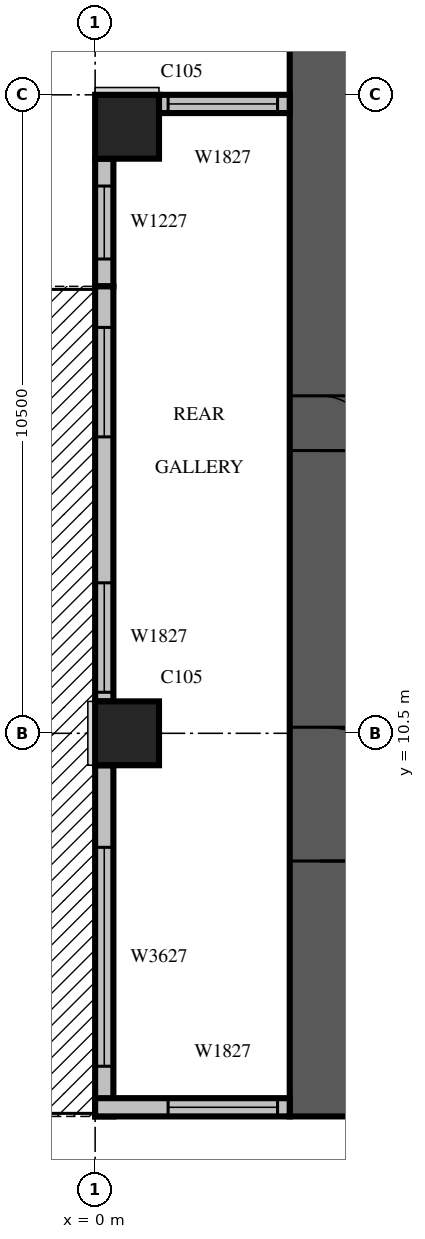
"""IFC4 building model, lengths in metres.
Left out: names, types, materials, properties, quantities, classifications, styles, units other than length and angle.
Written with IfcOpenShell. Run it as: python <this file> out.ifc"""

import sys

from ifc_helpers import new_model, si_unit, direction, frame, frame_2d, origin, origin_2d, place, context, subcontext, project, spatial, rectangle, extrude, source, transform, mapped, element, fill, save


model = new_model("IFC4")
c1 = context("Model", 3, precision=1e-05, world=origin(), true_north=direction((0.0, 1.0)))
c2 = subcontext(c1, "Body", "Model", "MODEL_VIEW")
j1 = project(units=[si_unit("LENGTHUNIT", "METRE"), si_unit("PLANEANGLEUNIT", "RADIAN")], contexts=[c1])
p1 = place(None, origin())
s1 = spatial("IfcSite", under=j1, at=p1, CompositionType="ELEMENT")
p2 = place(p1, origin())
s2 = spatial("IfcBuilding", under=s1, at=p2, CompositionType="ELEMENT")
p3 = place(p2, frame((0.0, 0.0, 137.1)))
s3 = spatial("IfcBuildingStorey", under=s2, at=p3, CompositionType="ELEMENT", Elevation=137.1)
m1 = source(origin(), c2, "Body", "SweptSolid", [
    extrude(rectangle(XDim=1.05, YDim=1.05, at=origin_2d()), origin(), (0.0, 0.0, 1.0), 4.2),
])
for number, where, z_axis, x_axis in (
    (1, (0.525, 10.5, 0.0), (0.0, 0.0, 1.0), (1.0, 0.0, 0.0)),
    (2, (0.525, 20.475, 0.0), (0.0, 0.0, 1.0), (1.0, 0.0, 0.0)),
):
    element("IfcColumn", number, at=place(p3, frame(where, z_axis=z_axis, x_axis=x_axis)), inside=s3, PredefinedType="COLUMN", context=c2, shape_type="MappedRepresentation", body=[
        mapped(m1, transform((0.0, 0.0, 0.0), scale=1.0)),
    ])
m2 = source(origin(), c2, "Body", "SweptSolid", [
    extrude(rectangle(XDim=17.8, YDim=1.0, at=frame_2d((8.9, 0.0))), origin(), (0.0, 0.0, 1.0), 4.2),
])
p4 = place(p3, frame((3.7, 4.2, 0.0), z_axis=(0.0, 0.0, 1.0), x_axis=(0.0, 1.0, 0.0)))
e3 = element("IfcWall", 3, at=p4, inside=s3, PredefinedType="SHEAR", context=c2, shape_type="MappedRepresentation", body=[
    mapped(m2, transform((0.0, 0.0, 0.0), scale=1.0)),
])
m3 = source(origin(), c2, "Body", "SweptSolid", [
    extrude(rectangle(XDim=2.2, YDim=2.1, at=frame_2d((1.1, 1.05))), frame((0.0, 0.51, 0.0), z_axis=(0.0, -1.0, 0.0), x_axis=(1.0, 0.0, 0.0)), (0.0, 0.0, 1.0), 1.02),
])
p5 = place(p4, frame((4.2, 0.0, 0.0)))
e4 = element("IfcOpeningElement", 4, at=p5, cuts=e3, PredefinedType="OPENING", context=c2, shape_type="MappedRepresentation", body=[
    mapped(m3, transform((0.0, 0.0, 0.0), scale=1.0)),
])
m4 = source(origin(), c2, "Body", "SweptSolid", [
    extrude(rectangle(XDim=0.9, YDim=2.1, at=frame_2d((0.45, 1.05))), frame((0.0, 0.51, 0.0), z_axis=(0.0, -1.0, 0.0), x_axis=(1.0, 0.0, 0.0)), (0.0, 0.0, 1.0), 1.02),
])
p6 = place(p4, frame((10.95, 0.0, 0.0)))
e5 = element("IfcOpeningElement", 5, at=p6, cuts=e3, PredefinedType="OPENING", context=c2, shape_type="MappedRepresentation", body=[
    mapped(m4, transform((0.0, 0.0, 0.0), scale=1.0)),
])
m5 = source(origin(), c2, "Body", "SweptSolid", [
    extrude(rectangle(XDim=2.15, YDim=0.3, at=frame_2d((1.075, 0.0))), origin(), (0.0, 0.0, 1.0), 3.8),
])
p7 = place(p3, frame((3.2, 20.85, 0.0), z_axis=(0.0, 0.0, 1.0), x_axis=(-1.0, 0.0, 0.0)))
e6 = element("IfcWall", 6, at=p7, inside=s3, PredefinedType="STANDARD", context=c2, shape_type="MappedRepresentation", body=[
    mapped(m5, transform((0.0, 0.0, 0.0), scale=1.0)),
])
m6 = source(origin(), c2, "Body", "SweptSolid", [
    extrude(rectangle(XDim=1.8, YDim=2.7, at=frame_2d((0.9, 1.35))), frame((0.0, 0.16, 0.0), z_axis=(0.0, -1.0, 0.0), x_axis=(1.0, 0.0, 0.0)), (0.0, 0.0, 1.0), 0.32),
])
p8 = place(p7, frame((0.2, 0.0, 0.6)))
e7 = element("IfcOpeningElement", 7, at=p8, cuts=e6, PredefinedType="OPENING", context=c2, shape_type="MappedRepresentation", body=[
    mapped(m6, transform((0.0, 0.0, 0.0), scale=1.0)),
])
m7 = source(origin(), c2, "Body", "SweptSolid", [
    extrude(rectangle(XDim=2.1, YDim=0.3, at=frame_2d((1.05, 0.0))), origin(), (0.0, 0.0, 1.0), 3.8),
])
p9 = place(p3, frame((0.15, 19.95, 0.0), z_axis=(0.0, 0.0, 1.0), x_axis=(0.0, -1.0, 0.0)))
e8 = element("IfcWall", 8, at=p9, inside=s3, PredefinedType="STANDARD", context=c2, shape_type="MappedRepresentation", body=[
    mapped(m7, transform((0.0, 0.0, 0.0), scale=1.0)),
])
m8 = source(origin(), c2, "Body", "SweptSolid", [
    extrude(rectangle(XDim=1.2, YDim=2.7, at=frame_2d((0.6, 1.35))), frame((0.0, 0.16, 0.0), z_axis=(0.0, -1.0, 0.0), x_axis=(1.0, 0.0, 0.0)), (0.0, 0.0, 1.0), 0.32),
])
p10 = place(p9, frame((0.45, 0.0, 0.6)))
e9 = element("IfcOpeningElement", 9, at=p10, cuts=e8, PredefinedType="OPENING", context=c2, shape_type="MappedRepresentation", body=[
    mapped(m8, transform((0.0, 0.0, 0.0), scale=1.0)),
])
m9 = source(origin(), c2, "Body", "SweptSolid", [
    extrude(rectangle(XDim=6.825, YDim=0.3, at=frame_2d((3.413, 0.0))), origin(), (0.0, 0.0, 1.0), 3.8),
])
p11 = place(p3, frame((0.15, 17.85, 0.0), z_axis=(0.0, 0.0, 1.0), x_axis=(0.0, -1.0, 0.0)))
e10 = element("IfcWall", 10, at=p11, inside=s3, PredefinedType="STANDARD", context=c2, shape_type="MappedRepresentation", body=[
    mapped(m9, transform((0.0, 0.0, 0.0), scale=1.0)),
])
m10 = source(origin(), c2, "Body", "SweptSolid", [
    extrude(rectangle(XDim=1.8, YDim=2.4, at=frame_2d((0.9, 1.2))), frame((0.0, 0.16, 0.0), z_axis=(0.0, -1.0, 0.0), x_axis=(1.0, 0.0, 0.0)), (0.0, 0.0, 1.0), 0.32),
])
p12 = place(p11, frame((0.675, 0.0, 0.0)))
e11 = element("IfcOpeningElement", 11, at=p12, cuts=e10, PredefinedType="OPENING", context=c2, shape_type="MappedRepresentation", body=[
    mapped(m10, transform((0.0, 0.0, 0.0), scale=1.0)),
])
p13 = place(p11, frame((4.875, 0.0, 0.6)))
e12 = element("IfcOpeningElement", 12, at=p13, cuts=e10, PredefinedType="OPENING", context=c2, shape_type="MappedRepresentation", body=[
    mapped(m6, transform((0.0, 0.0, 0.0), scale=1.0)),
])
m11 = source(origin(), c2, "Body", "SweptSolid", [
    extrude(rectangle(XDim=5.775, YDim=0.3, at=frame_2d((2.888, 0.0))), origin(), (0.0, 0.0, 1.0), 3.8),
])
p14 = place(p3, frame((0.15, 9.975, 0.0), z_axis=(0.0, 0.0, 1.0), x_axis=(0.0, -1.0, 0.0)))
e13 = element("IfcWall", 13, at=p14, inside=s3, PredefinedType="STANDARD", context=c2, shape_type="MappedRepresentation", body=[
    mapped(m11, transform((0.0, 0.0, 0.0), scale=1.0)),
])
m12 = source(origin(), c2, "Body", "SweptSolid", [
    extrude(rectangle(XDim=3.6, YDim=2.7, at=frame_2d((1.8, 1.35))), frame((0.0, 0.16, 0.0), z_axis=(0.0, -1.0, 0.0), x_axis=(1.0, 0.0, 0.0)), (0.0, 0.0, 1.0), 0.32),
])
p15 = place(p14, frame((1.35, 0.0, 0.6)))
e14 = element("IfcOpeningElement", 14, at=p15, cuts=e13, PredefinedType="OPENING", context=c2, shape_type="MappedRepresentation", body=[
    mapped(m12, transform((0.0, 0.0, 0.0), scale=1.0)),
])
m13 = source(origin(), c2, "Body", "SweptSolid", [
    extrude(rectangle(XDim=3.2, YDim=0.3, at=frame_2d((1.6, 0.0))), origin(), (0.0, 0.0, 1.0), 3.8),
])
p16 = place(p3, frame((0.0, 4.35, 0.0), z_axis=(0.0, 0.0, 1.0), x_axis=(1.0, 0.0, 0.0)))
e15 = element("IfcWall", 15, at=p16, inside=s3, PredefinedType="STANDARD", context=c2, shape_type="MappedRepresentation", body=[
    mapped(m13, transform((0.0, 0.0, 0.0), scale=1.0)),
])
p17 = place(p16, frame((1.2, 0.0, 0.6)))
e16 = element("IfcOpeningElement", 16, at=p17, cuts=e15, PredefinedType="OPENING", context=c2, shape_type="MappedRepresentation", body=[
    mapped(m6, transform((0.0, 0.0, 0.0), scale=1.0)),
])
m14 = source(origin(), c2, "Body", "SweptSolid", [
    extrude(rectangle(XDim=1.8, YDim=2.7, at=frame_2d((0.9, 1.35))), frame((0.0, 0.03, 0.0), z_axis=(0.0, -1.0, 0.0), x_axis=(1.0, 0.0, 0.0)), (0.0, 0.0, 1.0), 0.06),
])
p18 = place(p8, origin())
e17 = element("IfcWindow", 17, at=p18, inside=s3, PartitioningType="SINGLE_PANEL", PredefinedType="WINDOW", context=c2, shape_type="MappedRepresentation", body=[
    mapped(m14, transform((0.0, 0.0, 0.0), scale=1.0)),
])
fill(e7, e17)
m15 = source(origin(), c2, "Body", "SweptSolid", [
    extrude(rectangle(XDim=1.2, YDim=2.7, at=frame_2d((0.6, 1.35))), frame((0.0, 0.03, 0.0), z_axis=(0.0, -1.0, 0.0), x_axis=(1.0, 0.0, 0.0)), (0.0, 0.0, 1.0), 0.06),
])
p19 = place(p10, origin())
e18 = element("IfcWindow", 18, at=p19, inside=s3, PartitioningType="SINGLE_PANEL", PredefinedType="WINDOW", context=c2, shape_type="MappedRepresentation", body=[
    mapped(m15, transform((0.0, 0.0, 0.0), scale=1.0)),
])
fill(e9, e18)
m16 = source(origin(), c2, "Body", "SweptSolid", [
    extrude(rectangle(XDim=1.8, YDim=2.4, at=frame_2d((0.9, 1.2))), frame((0.0, 0.025, 0.0), z_axis=(0.0, -1.0, 0.0), x_axis=(1.0, 0.0, 0.0)), (0.0, 0.0, 1.0), 0.05),
])
p20 = place(p12, origin())
e19 = element("IfcDoor", 19, at=p20, inside=s3, OperationType="SLIDING_TO_LEFT", PredefinedType="DOOR", context=c2, shape_type="MappedRepresentation", body=[
    mapped(m16, transform((0.0, 0.0, 0.0), scale=1.0)),
])
fill(e11, e19)
p21 = place(p13, origin())
e20 = element("IfcWindow", 20, at=p21, inside=s3, PartitioningType="SINGLE_PANEL", PredefinedType="WINDOW", context=c2, shape_type="MappedRepresentation", body=[
    mapped(m14, transform((0.0, 0.0, 0.0), scale=1.0)),
])
fill(e12, e20)
m17 = source(origin(), c2, "Body", "SweptSolid", [
    extrude(rectangle(XDim=3.6, YDim=2.7, at=frame_2d((1.8, 1.35))), frame((0.0, 0.03, 0.0), z_axis=(0.0, -1.0, 0.0), x_axis=(1.0, 0.0, 0.0)), (0.0, 0.0, 1.0), 0.06),
])
p22 = place(p15, origin())
e21 = element("IfcWindow", 21, at=p22, inside=s3, PartitioningType="SINGLE_PANEL", PredefinedType="WINDOW", context=c2, shape_type="MappedRepresentation", body=[
    mapped(m17, transform((0.0, 0.0, 0.0), scale=1.0)),
])
fill(e14, e21)
p23 = place(p17, origin())
e22 = element("IfcWindow", 22, at=p23, inside=s3, PartitioningType="SINGLE_PANEL", PredefinedType="WINDOW", context=c2, shape_type="MappedRepresentation", body=[
    mapped(m14, transform((0.0, 0.0, 0.0), scale=1.0)),
])
fill(e16, e22)
m18 = source(origin(), c2, "Body", "SweptSolid", [
    extrude(rectangle(XDim=2.2, YDim=2.1, at=frame_2d((1.1, 1.05))), frame((0.0, 0.025, 0.0), z_axis=(0.0, -1.0, 0.0), x_axis=(1.0, 0.0, 0.0)), (0.0, 0.0, 1.0), 0.05),
])
p24 = place(p5, origin())
e23 = element("IfcDoor", 23, at=p24, inside=s3, OperationType="DOUBLE_DOOR_SINGLE_SWING", PredefinedType="DOOR", context=c2, shape_type="MappedRepresentation", body=[
    mapped(m18, transform((0.0, 0.0, 0.0), scale=1.0)),
])
fill(e4, e23)
m19 = source(origin(), c2, "Body", "SweptSolid", [
    extrude(rectangle(XDim=0.9, YDim=2.1, at=frame_2d((0.45, 1.05))), frame((0.0, 0.025, 0.0), z_axis=(0.0, -1.0, 0.0), x_axis=(1.0, 0.0, 0.0)), (0.0, 0.0, 1.0), 0.05),
])
p25 = place(p6, origin())
e24 = element("IfcDoor", 24, at=p25, inside=s3, OperationType="SINGLE_SWING_RIGHT", PredefinedType="DOOR", context=c2, shape_type="MappedRepresentation", body=[
    mapped(m19, transform((0.0, 0.0, 0.0), scale=1.0)),
])
fill(e5, e24)
save(model, sys.argv[1])
